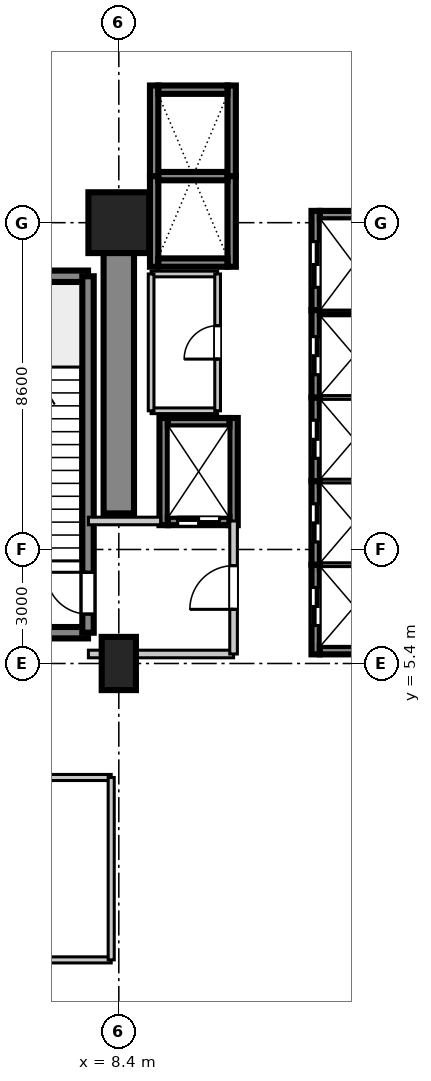
"""IFC4 building model, lengths in metres.
Left out: names, types, materials, properties, quantities, classifications, styles, units other than length and angle.
Written with IfcOpenShell. Run it as: python <this file> out.ifc"""

import sys

from ifc_helpers import new_model, si_unit, direction, frame, frame_2d, origin, origin_2d, place, context, subcontext, project, spatial, rectangle, extrude, source, transform, mapped, element, fill, save


model = new_model("IFC4")
c1 = context("Model", 3, precision=1e-05, world=origin(), true_north=direction((0.0, 1.0)))
c2 = subcontext(c1, "Body", "Model", "MODEL_VIEW")
j1 = project(units=[si_unit("LENGTHUNIT", "METRE"), si_unit("PLANEANGLEUNIT", "RADIAN")], contexts=[c1])
p1 = place(None, origin())
s1 = spatial("IfcSite", under=j1, at=p1, CompositionType="ELEMENT")
p2 = place(p1, origin())
s2 = spatial("IfcBuilding", under=s1, at=p2, CompositionType="ELEMENT")
p3 = place(p2, frame((0.0, 0.0, 5.4)))
s3 = spatial("IfcBuildingStorey", under=s2, at=p3, CompositionType="ELEMENT", Elevation=5.4)
m1 = source(origin(), c2, "Body", "SweptSolid", [
    extrude(rectangle(XDim=0.9, YDim=1.4, at=origin_2d()), origin(), (0.0, 0.0, 1.0), 5.355),
])
p4 = place(p3, frame((8.4, 5.4, 0.0), z_axis=(0.0, 0.0, 1.0), x_axis=(1.0, 0.0, 0.0)))
e1 = element("IfcColumn", 1, at=p4, inside=s3, PredefinedType="PILASTER", context=c2, shape_type="MappedRepresentation", body=[
    mapped(m1, transform((0.0, 0.0, 0.0), scale=1.0)),
])
m2 = source(origin(), c2, "Body", "SweptSolid", [
    extrude(rectangle(XDim=1.6, YDim=1.6, at=origin_2d()), origin(), (0.0, 0.0, 1.0), 5.355),
])
p5 = place(p3, frame((8.4, 17.0, 0.0), z_axis=(0.0, 0.0, 1.0), x_axis=(1.0, 0.0, 0.0)))
e2 = element("IfcColumn", 2, at=p5, inside=s3, PredefinedType="COLUMN", context=c2, shape_type="MappedRepresentation", body=[
    mapped(m2, transform((0.0, 0.0, 0.0), scale=1.0)),
])
m3 = source(origin(), c2, "Body", "SweptSolid", [
    extrude(rectangle(XDim=7.65, YDim=0.8, at=frame_2d((3.825, 0.0))), origin(), (0.0, 0.0, 1.0), 5.08),
])
p6 = place(p3, frame((8.4, 9.35, 0.0), z_axis=(0.0, 0.0, 1.0), x_axis=(0.0, 1.0, 0.0)))
e3 = element("IfcWall", 3, at=p6, inside=s3, PredefinedType="SHEAR", context=c2, shape_type="MappedRepresentation", body=[
    mapped(m3, transform((0.0, 0.0, 0.0), scale=1.0)),
])
m4 = source(origin(), c2, "Body", "SweptSolid", [
    extrude(rectangle(XDim=3.98, YDim=0.3, at=frame_2d((1.99, 0.0))), origin(), (0.0, 0.0, 1.0), 5.08),
])
for number, where, z_axis, x_axis in (
    (4, (3.61, 6.21, 0.0), (0.0, 0.0, 1.0), (1.0, 0.0, 0.0)),
    (5, (3.61, 15.59, 0.0), (0.0, 0.0, 1.0), (1.0, 0.0, 0.0)),
):
    element("IfcWall", number, at=place(p3, frame(where, z_axis=z_axis, x_axis=x_axis)), inside=s3, PredefinedType="SHEAR", context=c2, shape_type="MappedRepresentation", body=[
        mapped(m4, transform((0.0, 0.0, 0.0), scale=1.0)),
    ])
m5 = source(origin(), c2, "Body", "SweptSolid", [
    extrude(rectangle(XDim=9.38, YDim=0.3, at=frame_2d((4.69, 0.0))), origin(), (0.0, 0.0, 1.0), 5.08),
])
p7 = place(p3, frame((7.59, 6.21, 0.0), z_axis=(0.0, 0.0, 1.0), x_axis=(0.0, 1.0, 0.0)))
e6 = element("IfcWall", 6, at=p7, inside=s3, PredefinedType="SHEAR", context=c2, shape_type="MappedRepresentation", body=[
    mapped(m5, transform((0.0, 0.0, 0.0), scale=1.0)),
])
p8 = place(p7, frame((0.49, 0.0, 0.0)))
e7 = element("IfcOpeningElement", 7, at=p8, cuts=e6, PredefinedType="OPENING", context=c2, shape_type="SweptSolid", body=[
    extrude(rectangle(XDim=1.1, YDim=2.15, at=frame_2d((0.55, 1.075))), frame((0.0, 0.16, 0.0), z_axis=(0.0, -1.0, 0.0), x_axis=(1.0, 0.0, 0.0)), (0.0, 0.0, 1.0), 0.32),
])
m6 = source(origin(), c2, "Body", "SweptSolid", [
    extrude(rectangle(XDim=2.36, YDim=0.22, at=frame_2d((1.18, 0.0))), origin(), (0.0, 0.0, 1.0), 5.08),
])
p9 = place(p3, frame((13.58, 5.64, 0.0), z_axis=(0.0, 0.0, 1.0), x_axis=(0.0, 1.0, 0.0)))
e8 = element("IfcWall", 8, at=p9, inside=s3, PredefinedType="SHEAR", context=c2, shape_type="MappedRepresentation", body=[
    mapped(m6, transform((0.0, 0.0, 0.0), scale=1.0)),
])
p10 = place(p9, frame((0.76, 0.0, 0.0)))
e9 = element("IfcOpeningElement", 9, at=p10, cuts=e8, PredefinedType="OPENING", context=c2, shape_type="SweptSolid", body=[
    extrude(rectangle(XDim=1.0, YDim=2.2, at=frame_2d((0.5, 1.1))), frame((0.0, 0.12, 0.0), z_axis=(0.0, -1.0, 0.0), x_axis=(1.0, 0.0, 0.0)), (0.0, 0.0, 1.0), 0.24),
])
m7 = source(origin(), c2, "Body", "SweptSolid", [
    extrude(rectangle(XDim=1.82, YDim=0.22, at=frame_2d((0.91, 0.0))), origin(), (0.0, 0.0, 1.0), 5.08),
])
p11 = place(p3, frame((13.69, 5.75, 0.0), z_axis=(0.0, 0.0, 1.0), x_axis=(1.0, 0.0, 0.0)))
e10 = element("IfcWall", 10, at=p11, inside=s3, PredefinedType="SHEAR", context=c2, shape_type="MappedRepresentation", body=[
    mapped(m7, transform((0.0, 0.0, 0.0), scale=1.0)),
])
m8 = source(origin(), c2, "Body", "SweptSolid", [
    extrude(rectangle(XDim=1.82, YDim=0.22, at=frame_2d((0.91, 0.0))), origin(), (0.0, 0.0, 1.0), 5.4),
])
p12 = place(p3, frame((13.69, 8.0, 0.0), z_axis=(0.0, 0.0, 1.0), x_axis=(1.0, 0.0, 0.0)))
e11 = element("IfcWall", 11, at=p12, inside=s3, PredefinedType="SHEAR", context=c2, shape_type="MappedRepresentation", body=[
    mapped(m8, transform((0.0, 0.0, 0.0), scale=1.0)),
])
m9 = source(origin(), c2, "Body", "SweptSolid", [
    extrude(rectangle(XDim=2.2, YDim=0.22, at=frame_2d((1.1, 0.0))), origin(), (0.0, 0.0, 1.0), 5.08),
])
p13 = place(p3, frame((13.58, 8.0, 0.0), z_axis=(0.0, 0.0, 1.0), x_axis=(0.0, 1.0, 0.0)))
e12 = element("IfcWall", 12, at=p13, inside=s3, PredefinedType="SHEAR", context=c2, shape_type="MappedRepresentation", body=[
    mapped(m9, transform((0.0, 0.0, 0.0), scale=1.0)),
])
p14 = place(p13, frame((0.6, 0.0, 0.0)))
e13 = element("IfcOpeningElement", 13, at=p14, cuts=e12, PredefinedType="OPENING", context=c2, shape_type="SweptSolid", body=[
    extrude(rectangle(XDim=1.0, YDim=2.2, at=frame_2d((0.5, 1.1))), frame((0.0, 0.12, 0.0), z_axis=(0.0, -1.0, 0.0), x_axis=(1.0, 0.0, 0.0)), (0.0, 0.0, 1.0), 0.24),
])
p15 = place(p3, frame((13.69, 10.2, 0.0), z_axis=(0.0, 0.0, 1.0), x_axis=(1.0, 0.0, 0.0)))
e14 = element("IfcWall", 14, at=p15, inside=s3, PredefinedType="SHEAR", context=c2, shape_type="MappedRepresentation", body=[
    mapped(m8, transform((0.0, 0.0, 0.0), scale=1.0)),
])
p16 = place(p3, frame((13.58, 10.2, 0.0), z_axis=(0.0, 0.0, 1.0), x_axis=(0.0, 1.0, 0.0)))
e15 = element("IfcWall", 15, at=p16, inside=s3, PredefinedType="SHEAR", context=c2, shape_type="MappedRepresentation", body=[
    mapped(m9, transform((0.0, 0.0, 0.0), scale=1.0)),
])
p17 = place(p16, frame((0.6, 0.0, 0.0)))
e16 = element("IfcOpeningElement", 16, at=p17, cuts=e15, PredefinedType="OPENING", context=c2, shape_type="SweptSolid", body=[
    extrude(rectangle(XDim=1.0, YDim=2.2, at=frame_2d((0.5, 1.1))), frame((0.0, 0.12, 0.0), z_axis=(0.0, -1.0, 0.0), x_axis=(1.0, 0.0, 0.0)), (0.0, 0.0, 1.0), 0.24),
])
p18 = place(p3, frame((13.69, 12.4, 0.0), z_axis=(0.0, 0.0, 1.0), x_axis=(1.0, 0.0, 0.0)))
e17 = element("IfcWall", 17, at=p18, inside=s3, PredefinedType="SHEAR", context=c2, shape_type="MappedRepresentation", body=[
    mapped(m8, transform((0.0, 0.0, 0.0), scale=1.0)),
])
m10 = source(origin(), c2, "Body", "SweptSolid", [
    extrude(rectangle(XDim=2.3, YDim=0.22, at=frame_2d((1.15, 0.0))), origin(), (0.0, 0.0, 1.0), 5.08),
])
p19 = place(p3, frame((13.58, 12.4, 0.0), z_axis=(0.0, 0.0, 1.0), x_axis=(0.0, 1.0, 0.0)))
e18 = element("IfcWall", 18, at=p19, inside=s3, PredefinedType="SHEAR", context=c2, shape_type="MappedRepresentation", body=[
    mapped(m10, transform((0.0, 0.0, 0.0), scale=1.0)),
])
p20 = place(p19, frame((0.6, 0.0, 0.0)))
e19 = element("IfcOpeningElement", 19, at=p20, cuts=e18, PredefinedType="OPENING", context=c2, shape_type="SweptSolid", body=[
    extrude(rectangle(XDim=1.0, YDim=2.2, at=frame_2d((0.5, 1.1))), frame((0.0, 0.12, 0.0), z_axis=(0.0, -1.0, 0.0), x_axis=(1.0, 0.0, 0.0)), (0.0, 0.0, 1.0), 0.24),
])
p21 = place(p3, frame((13.69, 14.7, 0.0), z_axis=(0.0, 0.0, 1.0), x_axis=(1.0, 0.0, 0.0)))
e20 = element("IfcWall", 20, at=p21, inside=s3, PredefinedType="SHEAR", context=c2, shape_type="MappedRepresentation", body=[
    mapped(m8, transform((0.0, 0.0, 0.0), scale=1.0)),
])
m11 = source(origin(), c2, "Body", "SweptSolid", [
    extrude(rectangle(XDim=2.385, YDim=0.22, at=frame_2d((1.192, 0.0))), origin(), (0.0, 0.0, 1.0), 5.08),
])
for number, where, z_axis, x_axis in (
    (21, (9.33, 15.84, 0.0), (0.0, 0.0, 1.0), (0.0, 1.0, 0.0)),
    (22, (11.37, 15.84, 0.0), (0.0, 0.0, 1.0), (0.0, 1.0, 0.0)),
):
    element("IfcWall", number, at=place(p3, frame(where, z_axis=z_axis, x_axis=x_axis)), inside=s3, PredefinedType="SHEAR", context=c2, shape_type="MappedRepresentation", body=[
        mapped(m11, transform((0.0, 0.0, 0.0), scale=1.0)),
    ])
p22 = place(p3, frame((9.44, 15.95, 0.0), z_axis=(0.0, 0.0, 1.0), x_axis=(1.0, 0.0, 0.0)))
e23 = element("IfcWall", 23, at=p22, inside=s3, PredefinedType="SHEAR", context=c2, shape_type="MappedRepresentation", body=[
    mapped(m7, transform((0.0, 0.0, 0.0), scale=1.0)),
])
p23 = place(p3, frame((9.44, 18.225, 0.0), z_axis=(0.0, 0.0, 1.0), x_axis=(1.0, 0.0, 0.0)))
e24 = element("IfcWall", 24, at=p23, inside=s3, PredefinedType="SHEAR", context=c2, shape_type="MappedRepresentation", body=[
    mapped(m8, transform((0.0, 0.0, 0.0), scale=1.0)),
])
for number, where, z_axis, x_axis in (
    (25, (9.33, 18.225, 0.0), (0.0, 0.0, 1.0), (0.0, 1.0, 0.0)),
    (26, (11.37, 18.225, 0.0), (0.0, 0.0, 1.0), (0.0, 1.0, 0.0)),
):
    element("IfcWall", number, at=place(p3, frame(where, z_axis=z_axis, x_axis=x_axis)), inside=s3, PredefinedType="SHEAR", context=c2, shape_type="MappedRepresentation", body=[
        mapped(m11, transform((0.0, 0.0, 0.0), scale=1.0)),
    ])
p24 = place(p3, frame((9.44, 20.5, 0.0), z_axis=(0.0, 0.0, 1.0), x_axis=(1.0, 0.0, 0.0)))
e27 = element("IfcWall", 27, at=p24, inside=s3, PredefinedType="SHEAR", context=c2, shape_type="MappedRepresentation", body=[
    mapped(m7, transform((0.0, 0.0, 0.0), scale=1.0)),
])
m12 = source(origin(), c2, "Body", "SweptSolid", [
    extrude(rectangle(XDim=2.82, YDim=0.22, at=frame_2d((1.41, 0.0))), origin(), (0.0, 0.0, 1.0), 5.08),
])
for number, where, z_axis, x_axis in (
    (28, (9.58, 9.04, 0.0), (0.0, 0.0, 1.0), (0.0, 1.0, 0.0)),
    (29, (11.42, 9.04, 0.0), (0.0, 0.0, 1.0), (0.0, 1.0, 0.0)),
):
    element("IfcWall", number, at=place(p3, frame(where, z_axis=z_axis, x_axis=x_axis)), inside=s3, PredefinedType="SHEAR", context=c2, shape_type="MappedRepresentation", body=[
        mapped(m12, transform((0.0, 0.0, 0.0), scale=1.0)),
    ])
m13 = source(origin(), c2, "Body", "SweptSolid", [
    extrude(rectangle(XDim=1.62, YDim=0.22, at=frame_2d((0.81, 0.0))), origin(), (0.0, 0.0, 1.0), 5.08),
])
p25 = place(p3, frame((9.69, 9.15, 0.0), z_axis=(0.0, 0.0, 1.0), x_axis=(1.0, 0.0, 0.0)))
e30 = element("IfcWall", 30, at=p25, inside=s3, PredefinedType="SHEAR", context=c2, shape_type="MappedRepresentation", body=[
    mapped(m13, transform((0.0, 0.0, 0.0), scale=1.0)),
])
p26 = place(p25, frame((0.26, 0.0, 0.0)))
e31 = element("IfcOpeningElement", 31, at=p26, cuts=e30, PredefinedType="OPENING", context=c2, shape_type="SweptSolid", body=[
    extrude(rectangle(XDim=1.1, YDim=2.2, at=frame_2d((0.55, 1.1))), frame((0.0, 0.12, 0.0), z_axis=(0.0, -1.0, 0.0), x_axis=(1.0, 0.0, 0.0)), (0.0, 0.0, 1.0), 0.24),
])
p27 = place(p3, frame((9.69, 11.75, 0.0), z_axis=(0.0, 0.0, 1.0), x_axis=(1.0, 0.0, 0.0)))
e32 = element("IfcWall", 32, at=p27, inside=s3, PredefinedType="SHEAR", context=c2, shape_type="MappedRepresentation", body=[
    mapped(m13, transform((0.0, 0.0, 0.0), scale=1.0)),
])
m14 = source(origin(), c2, "Body", "SweptSolid", [
    extrude(rectangle(XDim=2.61, YDim=0.22, at=frame_2d((1.305, 0.0))), origin(), (0.0, 0.0, 1.0), 5.08),
])
p28 = place(p3, frame((13.58, 14.7, 0.0), z_axis=(0.0, 0.0, 1.0), x_axis=(0.0, 1.0, 0.0)))
e33 = element("IfcWall", 33, at=p28, inside=s3, PredefinedType="SHEAR", context=c2, shape_type="MappedRepresentation", body=[
    mapped(m14, transform((0.0, 0.0, 0.0), scale=1.0)),
])
p29 = place(p28, frame((0.6, 0.0, 0.0)))
e34 = element("IfcOpeningElement", 34, at=p29, cuts=e33, PredefinedType="OPENING", context=c2, shape_type="SweptSolid", body=[
    extrude(rectangle(XDim=1.2, YDim=2.2, at=frame_2d((0.6, 1.1))), frame((0.0, 0.12, 0.0), z_axis=(0.0, -1.0, 0.0), x_axis=(1.0, 0.0, 0.0)), (0.0, 0.0, 1.0), 0.24),
])
p30 = place(p3, frame((13.69, 17.2, 0.0), z_axis=(0.0, 0.0, 1.0), x_axis=(1.0, 0.0, 0.0)))
e35 = element("IfcWall", 35, at=p30, inside=s3, PredefinedType="SHEAR", context=c2, shape_type="MappedRepresentation", body=[
    mapped(m7, transform((0.0, 0.0, 0.0), scale=1.0)),
])
m15 = source(origin(), c2, "Body", "SweptSolid", [
    extrude(rectangle(XDim=3.82, YDim=0.2, at=frame_2d((1.91, 0.0))), origin(), (0.0, 0.0, 1.0), 3.4),
])
p31 = place(p3, frame((7.6, 5.65, 0.0), z_axis=(0.0, 0.0, 1.0), x_axis=(1.0, 0.0, 0.0)))
e36 = element("IfcWall", 36, at=p31, inside=s3, PredefinedType="PARTITIONING", context=c2, shape_type="MappedRepresentation", body=[
    mapped(m15, transform((0.0, 0.0, 0.0), scale=1.0)),
])
m16 = source(origin(), c2, "Body", "SweptSolid", [
    extrude(rectangle(XDim=1.9, YDim=0.2, at=frame_2d((0.95, 0.0))), origin(), (0.0, 0.0, 1.0), 3.4),
])
p32 = place(p3, frame((7.6, 9.15, 0.0), z_axis=(0.0, 0.0, 1.0), x_axis=(1.0, 0.0, 0.0)))
e37 = element("IfcWall", 37, at=p32, inside=s3, PredefinedType="PARTITIONING", context=c2, shape_type="MappedRepresentation", body=[
    mapped(m16, transform((0.0, 0.0, 0.0), scale=1.0)),
])
m17 = source(origin(), c2, "Body", "SweptSolid", [
    extrude(rectangle(XDim=3.5, YDim=0.2, at=frame_2d((1.75, 0.0))), origin(), (0.0, 0.0, 1.0), 3.4),
])
p33 = place(p3, frame((11.42, 5.65, 0.0), z_axis=(0.0, 0.0, 1.0), x_axis=(0.0, 1.0, 0.0)))
e38 = element("IfcWall", 38, at=p33, inside=s3, PredefinedType="PARTITIONING", context=c2, shape_type="MappedRepresentation", body=[
    mapped(m17, transform((0.0, 0.0, 0.0), scale=1.0)),
])
p34 = place(p33, frame((1.175, 0.0, 0.0)))
e39 = element("IfcOpeningElement", 39, at=p34, cuts=e38, PredefinedType="OPENING", context=c2, shape_type="SweptSolid", body=[
    extrude(rectangle(XDim=1.15, YDim=2.15, at=frame_2d((0.575, 1.075))), frame((0.0, 0.11, 0.0), z_axis=(0.0, -1.0, 0.0), x_axis=(1.0, 0.0, 0.0)), (0.0, 0.0, 1.0), 0.22),
])
m18 = source(origin(), c2, "Body", "SweptSolid", [
    extrude(rectangle(XDim=1.75, YDim=0.15, at=frame_2d((0.875, 0.0))), origin(), (0.0, 0.0, 1.0), 3.4),
])
for number, where, z_axis, x_axis in (
    (40, (9.25, 12.05, 0.0), (0.0, 0.0, 1.0), (1.0, 0.0, 0.0)),
    (41, (9.25, 15.65, 0.0), (0.0, 0.0, 1.0), (1.0, 0.0, 0.0)),
):
    element("IfcWall", number, at=place(p3, frame(where, z_axis=z_axis, x_axis=x_axis)), inside=s3, PredefinedType="PARTITIONING", context=c2, shape_type="MappedRepresentation", body=[
        mapped(m18, transform((0.0, 0.0, 0.0), scale=1.0)),
    ])
m19 = source(origin(), c2, "Body", "SweptSolid", [
    extrude(rectangle(XDim=3.6, YDim=0.15, at=frame_2d((1.8, 0.0))), origin(), (0.0, 0.0, 1.0), 3.4),
])
p35 = place(p3, frame((9.25, 12.05, 0.0), z_axis=(0.0, 0.0, 1.0), x_axis=(0.0, 1.0, 0.0)))
e42 = element("IfcWall", 42, at=p35, inside=s3, PredefinedType="PARTITIONING", context=c2, shape_type="MappedRepresentation", body=[
    mapped(m19, transform((0.0, 0.0, 0.0), scale=1.0)),
])
p36 = place(p3, frame((11.0, 12.05, 0.0), z_axis=(0.0, 0.0, 1.0), x_axis=(0.0, 1.0, 0.0)))
e43 = element("IfcWall", 43, at=p36, inside=s3, PredefinedType="PARTITIONING", context=c2, shape_type="MappedRepresentation", body=[
    mapped(m19, transform((0.0, 0.0, 0.0), scale=1.0)),
])
p37 = place(p36, frame((1.36, 0.0, 0.0)))
e44 = element("IfcOpeningElement", 44, at=p37, cuts=e43, PredefinedType="OPENING", context=c2, shape_type="SweptSolid", body=[
    extrude(rectangle(XDim=0.88, YDim=2.1, at=frame_2d((0.44, 1.05))), frame((0.0, 0.085, 0.0), z_axis=(0.0, -1.0, 0.0), x_axis=(1.0, 0.0, 0.0)), (0.0, 0.0, 1.0), 0.17),
])
m20 = source(origin(), c2, "Body", "SweptSolid", [
    extrude(rectangle(XDim=11.6, YDim=0.16, at=frame_2d((5.8, 0.0))), origin(), (0.0, 0.0, 1.0), 3.4),
])
p38 = place(p3, frame((-3.4, -2.4, 0.0), z_axis=(0.0, 0.0, 1.0), x_axis=(1.0, 0.0, 0.0)))
e45 = element("IfcWall", 45, at=p38, inside=s3, PredefinedType="PARTITIONING", context=c2, shape_type="MappedRepresentation", body=[
    mapped(m20, transform((0.0, 0.0, 0.0), scale=1.0)),
])
p39 = place(p3, frame((-3.4, 2.4, 0.0), z_axis=(0.0, 0.0, 1.0), x_axis=(1.0, 0.0, 0.0)))
e46 = element("IfcWall", 46, at=p39, inside=s3, PredefinedType="PARTITIONING", context=c2, shape_type="MappedRepresentation", body=[
    mapped(m20, transform((0.0, 0.0, 0.0), scale=1.0)),
])
p40 = place(p39, frame((2.483, 0.0, 0.0)))
e47 = element("IfcOpeningElement", 47, at=p40, cuts=e46, PredefinedType="OPENING", context=c2, shape_type="SweptSolid", body=[
    extrude(rectangle(XDim=1.5, YDim=2.15, at=frame_2d((0.75, 1.075))), frame((0.0, 0.09, 0.0), z_axis=(0.0, -1.0, 0.0), x_axis=(1.0, 0.0, 0.0)), (0.0, 0.0, 1.0), 0.18),
])
m21 = source(origin(), c2, "Body", "SweptSolid", [
    extrude(rectangle(XDim=4.8, YDim=0.16, at=frame_2d((2.4, 0.0))), origin(), (0.0, 0.0, 1.0), 3.4),
])
p41 = place(p3, frame((8.2, -2.4, 0.0), z_axis=(0.0, 0.0, 1.0), x_axis=(0.0, 1.0, 0.0)))
e48 = element("IfcWall", 48, at=p41, inside=s3, PredefinedType="PARTITIONING", context=c2, shape_type="MappedRepresentation", body=[
    mapped(m21, transform((0.0, 0.0, 0.0), scale=1.0)),
])
m22 = source(origin(), c2, "Body", "SweptSolid", [
    extrude(rectangle(XDim=1.1, YDim=2.15, at=frame_2d((0.55, 1.075))), frame((0.0, 0.025, 0.0), z_axis=(0.0, -1.0, 0.0), x_axis=(1.0, 0.0, 0.0)), (0.0, 0.0, 1.0), 0.05),
])
p42 = place(p8, origin())
e49 = element("IfcDoor", 49, at=p42, inside=s3, OperationType="SINGLE_SWING_RIGHT", PredefinedType="DOOR", context=c2, shape_type="MappedRepresentation", body=[
    mapped(m22, transform((0.0, 0.0, 0.0), scale=1.0)),
])
fill(e7, e49)
m23 = source(origin(), c2, "Body", "SweptSolid", [
    extrude(rectangle(XDim=1.0, YDim=2.2, at=frame_2d((0.5, 1.1))), frame((0.0, 0.025, 0.0), z_axis=(0.0, -1.0, 0.0), x_axis=(1.0, 0.0, 0.0)), (0.0, 0.0, 1.0), 0.05),
])
p43 = place(p10, origin())
e50 = element("IfcDoor", 50, at=p43, inside=s3, OperationType="DOUBLE_DOOR_SLIDING", PredefinedType="DOOR", context=c2, shape_type="MappedRepresentation", body=[
    mapped(m23, transform((0.0, 0.0, 0.0), scale=1.0)),
])
fill(e9, e50)
p44 = place(p14, origin())
e51 = element("IfcDoor", 51, at=p44, inside=s3, OperationType="DOUBLE_DOOR_SLIDING", PredefinedType="DOOR", context=c2, shape_type="MappedRepresentation", body=[
    mapped(m23, transform((0.0, 0.0, 0.0), scale=1.0)),
])
fill(e13, e51)
p45 = place(p17, origin())
e52 = element("IfcDoor", 52, at=p45, inside=s3, OperationType="DOUBLE_DOOR_SLIDING", PredefinedType="DOOR", context=c2, shape_type="MappedRepresentation", body=[
    mapped(m23, transform((0.0, 0.0, 0.0), scale=1.0)),
])
fill(e16, e52)
p46 = place(p20, origin())
e53 = element("IfcDoor", 53, at=p46, inside=s3, OperationType="DOUBLE_DOOR_SLIDING", PredefinedType="DOOR", context=c2, shape_type="MappedRepresentation", body=[
    mapped(m23, transform((0.0, 0.0, 0.0), scale=1.0)),
])
fill(e19, e53)
m24 = source(origin(), c2, "Body", "SweptSolid", [
    extrude(rectangle(XDim=1.1, YDim=2.2, at=frame_2d((0.55, 1.1))), frame((0.0, 0.025, 0.0), z_axis=(0.0, -1.0, 0.0), x_axis=(1.0, 0.0, 0.0)), (0.0, 0.0, 1.0), 0.05),
])
p47 = place(p26, frame((1.1, 0.0, 0.0), z_axis=(0.0, 0.0, 1.0), x_axis=(-1.0, 0.0, 0.0)))
e54 = element("IfcDoor", 54, at=p47, inside=s3, OperationType="DOUBLE_DOOR_SLIDING", PredefinedType="DOOR", context=c2, shape_type="MappedRepresentation", body=[
    mapped(m24, transform((0.0, 0.0, 0.0), scale=1.0)),
])
fill(e31, e54)
m25 = source(origin(), c2, "Body", "SweptSolid", [
    extrude(rectangle(XDim=1.2, YDim=2.2, at=frame_2d((0.6, 1.1))), frame((0.0, 0.025, 0.0), z_axis=(0.0, -1.0, 0.0), x_axis=(1.0, 0.0, 0.0)), (0.0, 0.0, 1.0), 0.05),
])
p48 = place(p29, origin())
e55 = element("IfcDoor", 55, at=p48, inside=s3, OperationType="DOUBLE_DOOR_SLIDING", PredefinedType="DOOR", context=c2, shape_type="MappedRepresentation", body=[
    mapped(m25, transform((0.0, 0.0, 0.0), scale=1.0)),
])
fill(e34, e55)
m26 = source(origin(), c2, "Body", "SweptSolid", [
    extrude(rectangle(XDim=1.15, YDim=2.15, at=frame_2d((0.575, 1.075))), frame((0.0, 0.025, 0.0), z_axis=(0.0, -1.0, 0.0), x_axis=(1.0, 0.0, 0.0)), (0.0, 0.0, 1.0), 0.05),
])
p49 = place(p34, frame((1.15, 0.0, 0.0), z_axis=(0.0, 0.0, 1.0), x_axis=(-1.0, 0.0, 0.0)))
e56 = element("IfcDoor", 56, at=p49, inside=s3, OperationType="SINGLE_SWING_LEFT", PredefinedType="DOOR", context=c2, shape_type="MappedRepresentation", body=[
    mapped(m26, transform((0.0, 0.0, 0.0), scale=1.0)),
])
fill(e39, e56)
m27 = source(origin(), c2, "Body", "SweptSolid", [
    extrude(rectangle(XDim=0.88, YDim=2.1, at=frame_2d((0.44, 1.05))), frame((0.0, 0.025, 0.0), z_axis=(0.0, -1.0, 0.0), x_axis=(1.0, 0.0, 0.0)), (0.0, 0.0, 1.0), 0.05),
])
p50 = place(p37, origin())
e57 = element("IfcDoor", 57, at=p50, inside=s3, OperationType="SINGLE_SWING_LEFT", PredefinedType="DOOR", context=c2, shape_type="MappedRepresentation", body=[
    mapped(m27, transform((0.0, 0.0, 0.0), scale=1.0)),
])
fill(e44, e57)
save(model, sys.argv[1])
